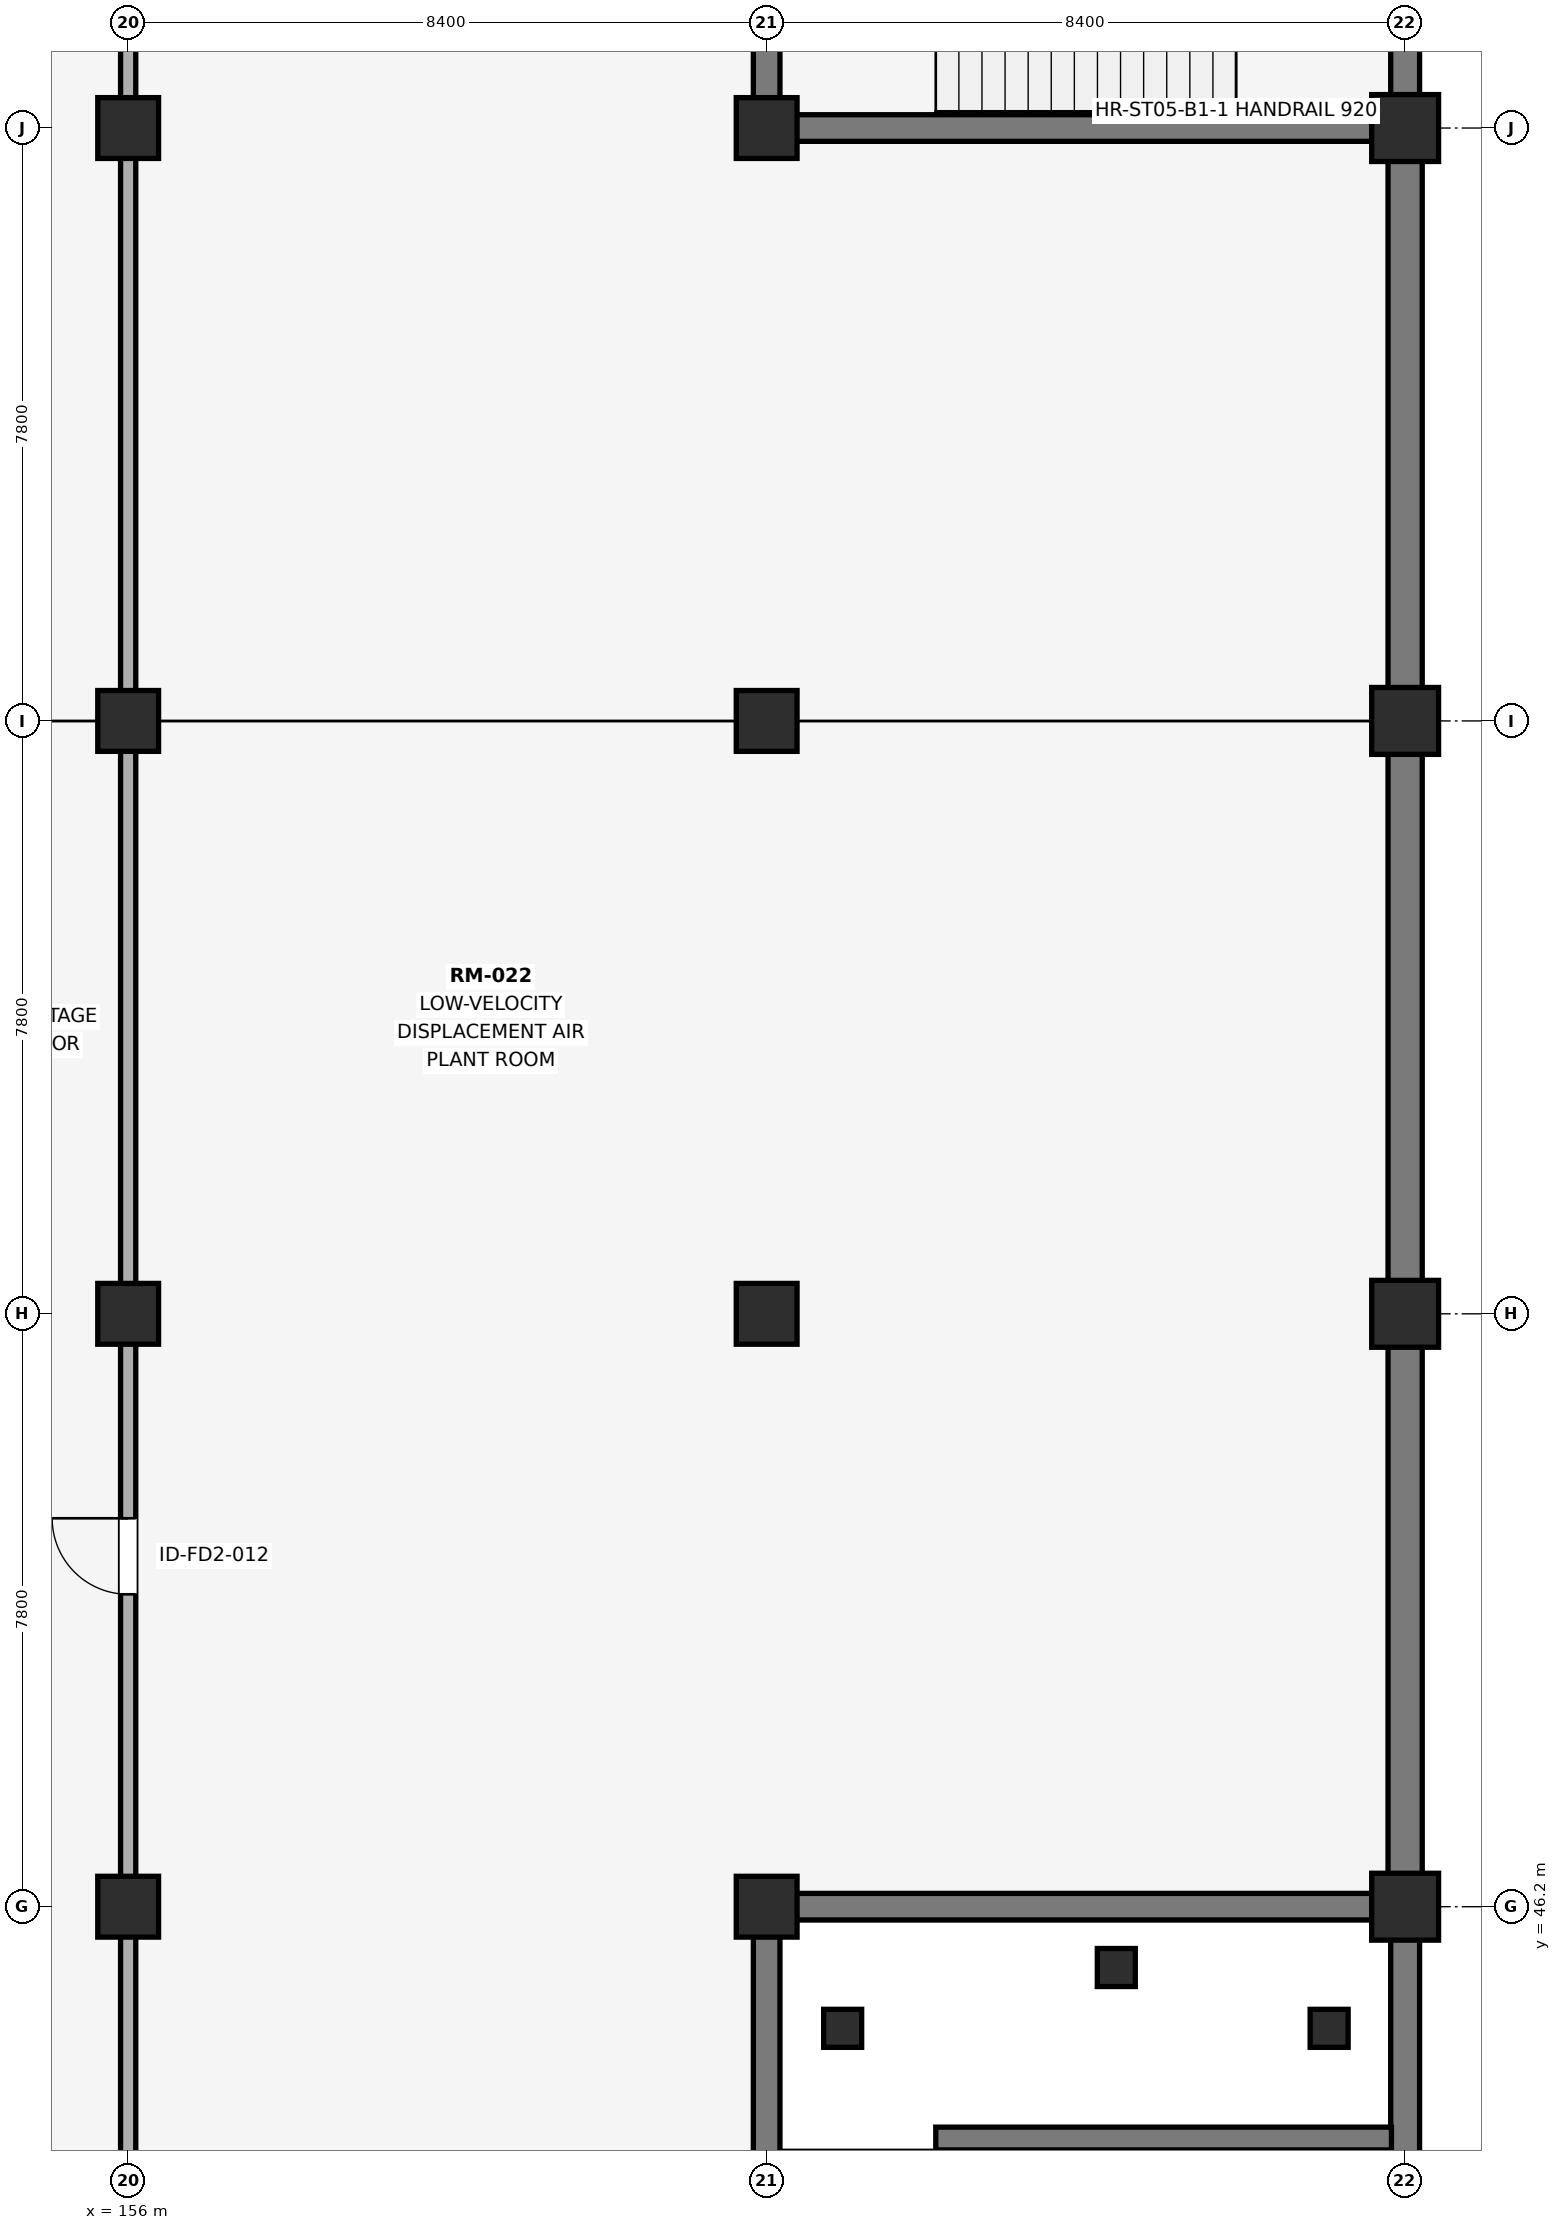
"""IFC4 building model, lengths in metres.
Left out: names, types, materials, properties, quantities, classifications, styles, units other than length and angle.
Written with IfcOpenShell. Run it as: python <this file> out.ifc"""

import sys

from ifc_helpers import new_model, si_unit, direction, frame, frame_2d, origin, origin_2d, place, context, subcontext, project, spatial, rectangle, extrude, element, fill, save


model = new_model("IFC4")
c1 = context("Model", 3, precision=1e-05, world=origin(), true_north=direction((0.0, 1.0)))
c2 = subcontext(c1, "Body", "Model", "MODEL_VIEW")
j1 = project(units=[si_unit("LENGTHUNIT", "METRE"), si_unit("PLANEANGLEUNIT", "RADIAN")], contexts=[c1])
p1 = place(None, origin())
s1 = spatial("IfcSite", under=j1, at=p1, CompositionType="ELEMENT")
p2 = place(p1, origin())
s2 = spatial("IfcBuilding", under=s1, at=p2, CompositionType="ELEMENT")
p3 = place(p2, frame((0.0, 0.0, -4.8)))
s3 = spatial("IfcBuildingStorey", under=s2, at=p3, CompositionType="ELEMENT", Elevation=-4.8)
for number, where, z_axis, x_axis in (
    (1, (156.0, 46.2, -0.45), (0.0, 0.0, 1.0), (1.0, 0.0, 0.0)),
    (2, (156.0, 54.0, -0.45), (0.0, 0.0, 1.0), (1.0, 0.0, 0.0)),
    (3, (156.0, 61.8, -0.45), (0.0, 0.0, 1.0), (1.0, 0.0, 0.0)),
    (4, (156.0, 69.6, -0.45), (0.0, 0.0, 1.0), (1.0, 0.0, 0.0)),
    (5, (164.4, 46.2, -0.45), (0.0, 0.0, 1.0), (1.0, 0.0, 0.0)),
    (6, (164.4, 54.0, -0.45), (0.0, 0.0, 1.0), (1.0, 0.0, 0.0)),
    (7, (164.4, 61.8, -0.45), (0.0, 0.0, 1.0), (1.0, 0.0, 0.0)),
    (8, (164.4, 69.6, -0.45), (0.0, 0.0, 1.0), (1.0, 0.0, 0.0)),
):
    element("IfcColumn", number, at=place(p3, frame(where, z_axis=z_axis, x_axis=x_axis)), inside=s3, PredefinedType="COLUMN", context=c2, shape_type="SweptSolid", body=[
        extrude(rectangle(XDim=0.8, YDim=0.8, at=origin_2d()), origin(), (0.0, 0.0, 1.0), 5.25),
    ])
for number, where, z_axis, x_axis in (
    (9, (172.8, 46.2, -0.45), (0.0, 0.0, 1.0), (1.0, 0.0, 0.0)),
    (10, (172.8, 54.0, -0.45), (0.0, 0.0, 1.0), (1.0, 0.0, 0.0)),
    (11, (172.8, 61.8, -0.45), (0.0, 0.0, 1.0), (1.0, 0.0, 0.0)),
    (12, (172.8, 69.6, -0.45), (0.0, 0.0, 1.0), (1.0, 0.0, 0.0)),
):
    element("IfcColumn", number, at=place(p3, frame(where, z_axis=z_axis, x_axis=x_axis)), inside=s3, PredefinedType="COLUMN", context=c2, shape_type="SweptSolid", body=[
        extrude(rectangle(XDim=0.88, YDim=0.88, at=origin_2d()), origin(), (0.0, 0.0, 1.0), 5.25),
    ])
p4 = place(p3, frame((172.8, 69.35, 0.0), z_axis=(0.0, 0.0, 1.0), x_axis=(0.0, -1.0, 0.0)))
e13 = element("IfcWall", 13, at=p4, inside=s3, PredefinedType="USERDEFINED", context=c2, shape_type="SweptSolid", body=[
    extrude(rectangle(XDim=22.9, YDim=0.45, at=frame_2d((11.45, 0.0))), origin(), (0.0, 0.0, 1.0), 4.8),
])
p5 = place(p3, frame((164.225, 69.6, 0.0), z_axis=(0.0, 0.0, 1.0), x_axis=(1.0, 0.0, 0.0)))
e14 = element("IfcWall", 14, at=p5, inside=s3, PredefinedType="SHEAR", context=c2, shape_type="SweptSolid", body=[
    extrude(rectangle(XDim=8.75, YDim=0.35, at=frame_2d((4.375, 0.0))), origin(), (0.0, 0.0, 1.0), 4.8),
])
p6 = place(p3, frame((164.4, 69.775, 0.0), z_axis=(0.0, 0.0, 1.0), x_axis=(0.0, 1.0, 0.0)))
e15 = element("IfcWall", 15, at=p6, inside=s3, PredefinedType="SHEAR", context=c2, shape_type="SweptSolid", body=[
    extrude(rectangle(XDim=7.45, YDim=0.35, at=frame_2d((3.725, 0.0))), origin(), (0.0, 0.0, 1.0), 4.8),
])
p7 = place(p6, frame((2.1, 0.0, 0.0)))
e16 = element("IfcOpeningElement", 16, at=p7, cuts=e15, PredefinedType="OPENING", context=c2, shape_type="SweptSolid", body=[
    extrude(rectangle(XDim=1.1, YDim=2.2, at=frame_2d((0.55, 1.1))), frame((0.0, 0.185, 0.0), z_axis=(0.0, -1.0, 0.0), x_axis=(1.0, 0.0, 0.0)), (0.0, 0.0, 1.0), 0.37),
])
p8 = place(p3, frame((172.8, 69.775, 0.0), z_axis=(0.0, 0.0, 1.0), x_axis=(0.0, 1.0, 0.0)))
e17 = element("IfcWall", 17, at=p8, inside=s3, PredefinedType="SHEAR", context=c2, shape_type="SweptSolid", body=[
    extrude(rectangle(XDim=7.45, YDim=0.38, at=frame_2d((3.725, 0.0))), origin(), (0.0, 0.0, 1.0), 4.8),
])
p9 = place(p3, frame((164.225, 46.2, 0.0), z_axis=(0.0, 0.0, 1.0), x_axis=(1.0, 0.0, 0.0)))
e18 = element("IfcWall", 18, at=p9, inside=s3, PredefinedType="SHEAR", context=c2, shape_type="SweptSolid", body=[
    extrude(rectangle(XDim=8.75, YDim=0.35, at=frame_2d((4.375, 0.0))), origin(), (0.0, 0.0, 1.0), 4.8),
])
p10 = place(p3, frame((164.4, 38.575, 0.0), z_axis=(0.0, 0.0, 1.0), x_axis=(0.0, 1.0, 0.0)))
e19 = element("IfcWall", 19, at=p10, inside=s3, PredefinedType="SHEAR", context=c2, shape_type="SweptSolid", body=[
    extrude(rectangle(XDim=7.45, YDim=0.35, at=frame_2d((3.725, 0.0))), origin(), (0.0, 0.0, 1.0), 4.8),
])
p11 = place(p10, frame((2.1, 0.0, 0.0)))
e20 = element("IfcOpeningElement", 20, at=p11, cuts=e19, PredefinedType="OPENING", context=c2, shape_type="SweptSolid", body=[
    extrude(rectangle(XDim=1.1, YDim=2.2, at=frame_2d((0.55, 1.1))), frame((0.0, 0.185, 0.0), z_axis=(0.0, -1.0, 0.0), x_axis=(1.0, 0.0, 0.0)), (0.0, 0.0, 1.0), 0.37),
])
p12 = place(p3, frame((172.8, 38.575, 0.0), z_axis=(0.0, 0.0, 1.0), x_axis=(0.0, 1.0, 0.0)))
e21 = element("IfcWall", 21, at=p12, inside=s3, PredefinedType="SHEAR", context=c2, shape_type="SweptSolid", body=[
    extrude(rectangle(XDim=7.45, YDim=0.38, at=frame_2d((3.725, 0.0))), origin(), (0.0, 0.0, 1.0), 4.8),
])
p13 = place(p3, frame((166.625, 43.15, 0.0), z_axis=(0.0, 0.0, 1.0), x_axis=(1.0, 0.0, 0.0)))
e22 = element("IfcWall", 22, at=p13, inside=s3, PredefinedType="SHEAR", context=c2, shape_type="SweptSolid", body=[
    extrude(rectangle(XDim=5.995, YDim=0.3, at=frame_2d((2.998, 0.0))), origin(), (0.0, 0.0, 1.0), 4.8),
])
for number, where, z_axis, x_axis in (
    (23, (165.4, 44.6, -0.45), (0.0, 0.0, 1.0), (1.0, 0.0, 0.0)),
    (24, (169.0, 45.4, -0.45), (0.0, 0.0, 1.0), (1.0, 0.0, 0.0)),
    (25, (171.8, 44.6, -0.45), (0.0, 0.0, 1.0), (1.0, 0.0, 0.0)),
):
    element("IfcColumn", number, at=place(p3, frame(where, z_axis=z_axis, x_axis=x_axis)), inside=s3, PredefinedType="COLUMN", context=c2, shape_type="SweptSolid", body=[
        extrude(rectangle(XDim=0.5, YDim=0.5, at=origin_2d()), origin(), (0.0, 0.0, 1.0), 5.03),
    ])
p14 = place(p3, frame((156.0, 30.31, 0.0), z_axis=(0.0, 0.0, 1.0), x_axis=(0.0, 1.0, 0.0)))
e26 = element("IfcWall", 26, at=p14, inside=s3, PredefinedType="PARTITIONING", context=c2, shape_type="SweptSolid", body=[
    extrude(rectangle(XDim=51.53, YDim=0.2, at=frame_2d((25.765, 0.0))), origin(), (0.0, 0.0, 1.0), 3.68),
])
p15 = place(p14, frame((5.5, 0.0, 0.0)))
e27 = element("IfcOpeningElement", 27, at=p15, cuts=e26, PredefinedType="OPENING", context=c2, shape_type="SweptSolid", body=[
    extrude(rectangle(XDim=1.0, YDim=2.2, at=frame_2d((0.5, 1.1))), frame((0.0, 0.11, 0.0), z_axis=(0.0, -1.0, 0.0), x_axis=(1.0, 0.0, 0.0)), (0.0, 0.0, 1.0), 0.22),
])
p16 = place(p14, frame((20.0, 0.0, 0.0)))
e28 = element("IfcOpeningElement", 28, at=p16, cuts=e26, PredefinedType="OPENING", context=c2, shape_type="SweptSolid", body=[
    extrude(rectangle(XDim=1.0, YDim=2.2, at=frame_2d((0.5, 1.1))), frame((0.0, 0.11, 0.0), z_axis=(0.0, -1.0, 0.0), x_axis=(1.0, 0.0, 0.0)), (0.0, 0.0, 1.0), 0.22),
])
p17 = place(p16, origin())
e29 = element("IfcDoor", 29, at=p17, inside=s3, OperationType="SINGLE_SWING_RIGHT", PredefinedType="DOOR", context=c2, shape_type="SweptSolid", body=[
    extrude(rectangle(XDim=1.0, YDim=2.2, at=frame_2d((0.5, 1.1))), frame((0.0, 0.025, 0.0), z_axis=(0.0, -1.0, 0.0), x_axis=(1.0, 0.0, 0.0)), (0.0, 0.0, 1.0), 0.05),
])
fill(e28, e29)
save(model, sys.argv[1])
